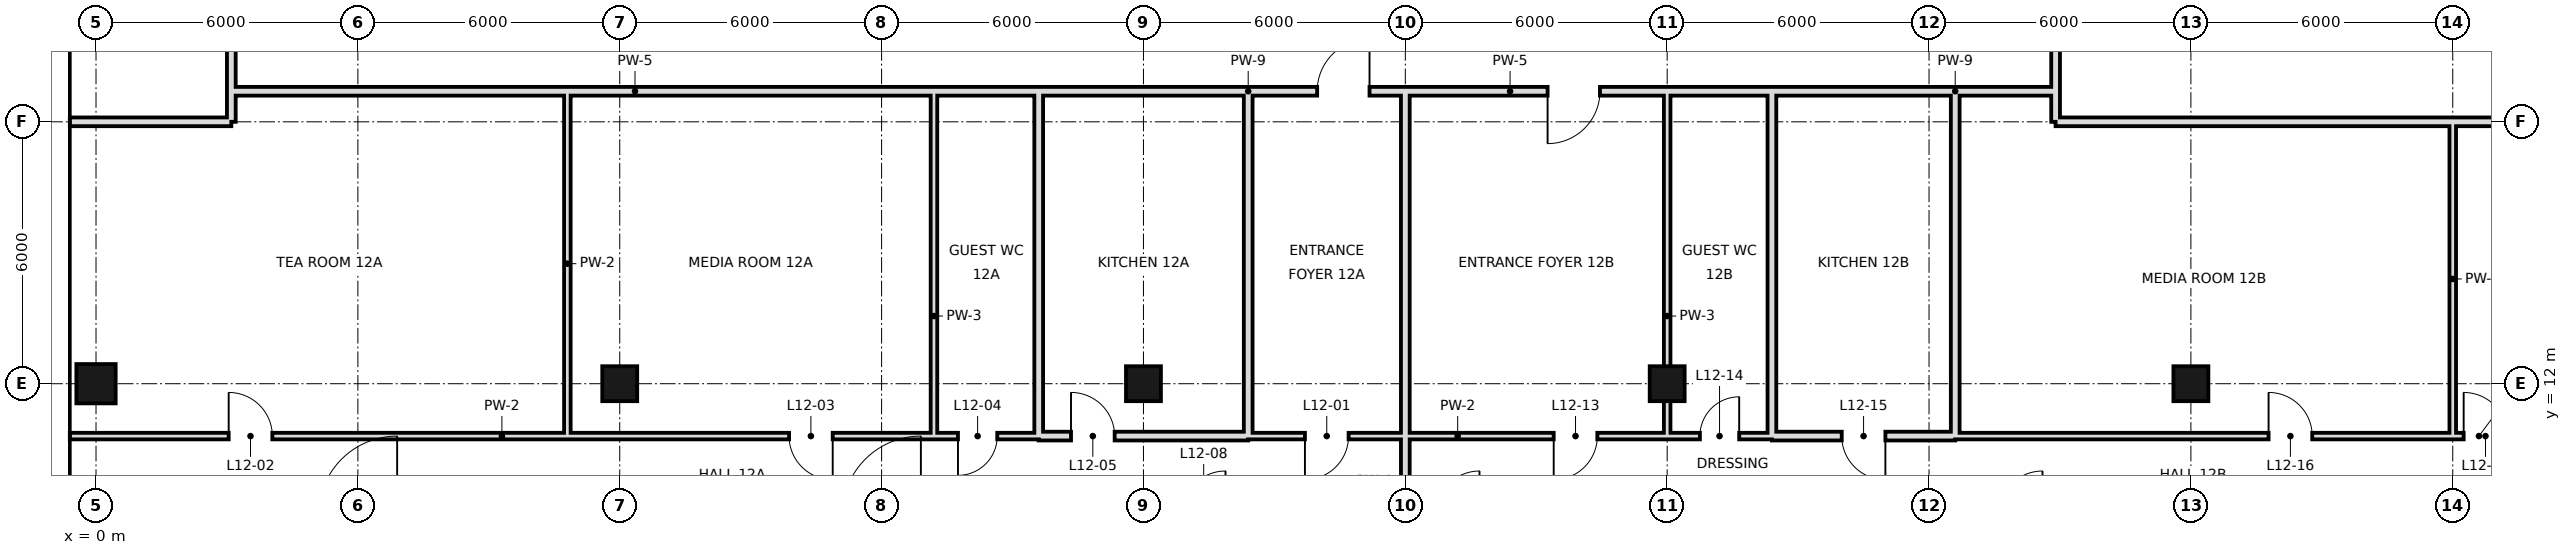
"""IFC4 building model, lengths in metres.
Left out: names, types, materials, properties, quantities, classifications, styles, units other than length and angle.
Written with IfcOpenShell. Run it as: python <this file> out.ifc"""

import sys

from ifc_helpers import new_model, si_unit, direction, frame, frame_2d, origin, origin_2d, place, context, subcontext, project, spatial, rectangle, hollow_rectangle, extrude, element, fill, save


model = new_model("IFC4")
c1 = context("Model", 3, precision=1e-05, world=origin(), true_north=direction((0.0, 1.0)))
c2 = subcontext(c1, "Body", "Model", "MODEL_VIEW")
j1 = project(units=[si_unit("LENGTHUNIT", "METRE"), si_unit("PLANEANGLEUNIT", "RADIAN")], contexts=[c1])
p1 = place(None, origin())
s1 = spatial("IfcSite", under=j1, at=p1, CompositionType="ELEMENT")
p2 = place(p1, origin())
s2 = spatial("IfcBuilding", under=s1, at=p2, CompositionType="ELEMENT")
p3 = place(p2, frame((0.0, 0.0, 64.2)))
s3 = spatial("IfcBuildingStorey", under=s2, at=p3, CompositionType="ELEMENT", Elevation=64.2)
p4 = place(p3, frame((0.0, 12.0, 0.0), z_axis=(0.0, 0.0, 1.0), x_axis=(1.0, 0.0, 0.0)))
e1 = element("IfcColumn", 1, at=p4, inside=s3, PredefinedType="COLUMN", context=c2, shape_type="SweptSolid", body=[
    extrude(hollow_rectangle(XDim=0.9, YDim=0.9, WallThickness=0.045, at=origin_2d()), origin(), (0.0, 0.0, 1.0), 3.6),
])
for number, where, z_axis, x_axis in (
    (2, (12.0, 12.0, 0.0), (0.0, 0.0, 1.0), (1.0, 0.0, 0.0)),
    (3, (24.0, 12.0, 0.0), (0.0, 0.0, 1.0), (1.0, 0.0, 0.0)),
    (4, (36.0, 12.0, 0.0), (0.0, 0.0, 1.0), (1.0, 0.0, 0.0)),
    (5, (48.0, 12.0, 0.0), (0.0, 0.0, 1.0), (1.0, 0.0, 0.0)),
):
    element("IfcColumn", number, at=place(p3, frame(where, z_axis=z_axis, x_axis=x_axis)), inside=s3, PredefinedType="COLUMN", context=c2, shape_type="SweptSolid", body=[
        extrude(hollow_rectangle(XDim=0.8, YDim=0.8, WallThickness=0.04, at=origin_2d()), origin(), (0.0, 0.0, 1.0), 3.6),
    ])
for number, where, z_axis, x_axis in (
    (6, (10.8, 10.8, 0.0), (0.0, 0.0, 1.0), (0.0, 1.0, 0.0)),
    (7, (19.2, 10.8, 0.0), (0.0, 0.0, 1.0), (0.0, 1.0, 0.0)),
):
    element("IfcWall", number, at=place(p3, frame(where, z_axis=z_axis, x_axis=x_axis)), inside=s3, PredefinedType="PARTITIONING", context=c2, shape_type="SweptSolid", body=[
        extrude(rectangle(XDim=7.9, YDim=0.15, at=frame_2d((3.95, 0.0))), origin(), (0.0, 0.0, 1.0), 3.42),
    ])
for number, where, z_axis, x_axis in (
    (8, (21.6, 10.8, 0.0), (0.0, 0.0, 1.0), (0.0, 1.0, 0.0)),
    (9, (26.4, 10.8, 0.0), (0.0, 0.0, 1.0), (0.0, 1.0, 0.0)),
):
    element("IfcWall", number, at=place(p3, frame(where, z_axis=z_axis, x_axis=x_axis)), inside=s3, PredefinedType="SOLIDWALL", context=c2, shape_type="SweptSolid", body=[
        extrude(rectangle(XDim=7.9, YDim=0.2, at=frame_2d((3.95, 0.0))), origin(), (0.0, 0.0, 1.0), 2.72),
    ])
p5 = place(p3, frame((3.1, 18.0, 0.0), z_axis=(0.0, 0.0, 1.0), x_axis=(0.0, 1.0, 0.0)))
e10 = element("IfcWall", 10, at=p5, inside=s3, PredefinedType="SOLIDWALL", context=c2, shape_type="SweptSolid", body=[
    extrude(rectangle(XDim=27.949, YDim=0.2, at=frame_2d((13.975, 0.0))), origin(), (0.0, 0.0, 1.0), 2.97),
])
p6 = place(p5, frame((8.36, 0.0, 0.0)))
e11 = element("IfcOpeningElement", 11, at=p6, cuts=e10, PredefinedType="OPENING", context=c2, shape_type="SweptSolid", body=[
    extrude(rectangle(XDim=1.2, YDim=2.4, at=frame_2d((0.6, 1.2))), frame((0.0, 0.11, 0.0), z_axis=(0.0, -1.0, 0.0), x_axis=(1.0, 0.0, 0.0)), (0.0, 0.0, 1.0), 0.22),
])
p7 = place(p3, frame((30.0, -0.6, 0.0), z_axis=(0.0, 0.0, 1.0), x_axis=(0.0, 1.0, 0.0)))
e12 = element("IfcWall", 12, at=p7, inside=s3, PredefinedType="SOLIDWALL", context=c2, shape_type="SweptSolid", body=[
    extrude(rectangle(XDim=19.3, YDim=0.2, at=frame_2d((9.65, 0.0))), origin(), (0.0, 0.0, 1.0), 2.72),
])
p8 = place(p3, frame((36.0, 10.8, 0.0), z_axis=(0.0, 0.0, 1.0), x_axis=(0.0, 1.0, 0.0)))
e13 = element("IfcWall", 13, at=p8, inside=s3, PredefinedType="PARTITIONING", context=c2, shape_type="SweptSolid", body=[
    extrude(rectangle(XDim=7.9, YDim=0.15, at=frame_2d((3.95, 0.0))), origin(), (0.0, 0.0, 1.0), 2.72),
])
for number, where, z_axis, x_axis in (
    (14, (38.4, 10.8, 0.0), (0.0, 0.0, 1.0), (0.0, 1.0, 0.0)),
    (15, (42.6, 10.8, 0.0), (0.0, 0.0, 1.0), (0.0, 1.0, 0.0)),
):
    element("IfcWall", number, at=place(p3, frame(where, z_axis=z_axis, x_axis=x_axis)), inside=s3, PredefinedType="SOLIDWALL", context=c2, shape_type="SweptSolid", body=[
        extrude(rectangle(XDim=7.9, YDim=0.2, at=frame_2d((3.95, 0.0))), origin(), (0.0, 0.0, 1.0), 2.72),
    ])
p9 = place(p3, frame((44.9, 18.7, 0.0), z_axis=(0.0, 0.0, 1.0), x_axis=(0.0, 1.0, 0.0)))
e16 = element("IfcWall", 16, at=p9, inside=s3, PredefinedType="SOLIDWALL", context=c2, shape_type="SweptSolid", body=[
    extrude(rectangle(XDim=7.1, YDim=0.2, at=frame_2d((3.55, 0.0))), origin(), (0.0, 0.0, 1.0), 3.42),
])
p10 = place(p3, frame((44.9, 18.0, 0.0), z_axis=(0.0, 0.0, 1.0), x_axis=(0.0, 1.0, 0.0)))
e17 = element("IfcWall", 17, at=p10, inside=s3, PredefinedType="SOLIDWALL", context=c2, shape_type="SweptSolid", body=[
    extrude(rectangle(XDim=0.7, YDim=0.2, at=frame_2d((0.35, 0.0))), origin(), (0.0, 0.0, 1.0), 2.97),
])
p11 = place(p3, frame((54.0, 10.8, 0.0), z_axis=(0.0, 0.0, 1.0), x_axis=(0.0, 1.0, 0.0)))
e18 = element("IfcWall", 18, at=p11, inside=s3, PredefinedType="PARTITIONING", context=c2, shape_type="SweptSolid", body=[
    extrude(rectangle(XDim=7.2, YDim=0.15, at=frame_2d((3.6, 0.0))), origin(), (0.0, 0.0, 1.0), 3.42),
])
p12 = place(p3, frame((21.6, 10.8, 0.0), z_axis=(0.0, 0.0, 1.0), x_axis=(1.0, 0.0, 0.0)))
e19 = element("IfcWall", 19, at=p12, inside=s3, PredefinedType="SOLIDWALL", context=c2, shape_type="SweptSolid", body=[
    extrude(rectangle(XDim=4.8, YDim=0.2, at=frame_2d((2.4, 0.0))), origin(), (0.0, 0.0, 1.0), 2.72),
])
p13 = place(p12, frame((0.74, 0.0, 0.0)))
e20 = element("IfcOpeningElement", 20, at=p13, cuts=e19, PredefinedType="OPENING", context=c2, shape_type="SweptSolid", body=[
    extrude(rectangle(XDim=1.0, YDim=2.4, at=frame_2d((0.5, 1.2))), frame((0.0, 0.11, 0.0), z_axis=(0.0, -1.0, 0.0), x_axis=(1.0, 0.0, 0.0)), (0.0, 0.0, 1.0), 0.22),
])
p14 = place(p3, frame((38.4, 10.8, 0.0), z_axis=(0.0, 0.0, 1.0), x_axis=(1.0, 0.0, 0.0)))
e21 = element("IfcWall", 21, at=p14, inside=s3, PredefinedType="SOLIDWALL", context=c2, shape_type="SweptSolid", body=[
    extrude(rectangle(XDim=4.2, YDim=0.2, at=frame_2d((2.1, 0.0))), origin(), (0.0, 0.0, 1.0), 2.72),
])
p15 = place(p14, frame((1.6, 0.0, 0.0)))
e22 = element("IfcOpeningElement", 22, at=p15, cuts=e21, PredefinedType="OPENING", context=c2, shape_type="SweptSolid", body=[
    extrude(rectangle(XDim=1.0, YDim=2.4, at=frame_2d((0.5, 1.2))), frame((0.0, 0.11, 0.0), z_axis=(0.0, -1.0, 0.0), x_axis=(1.0, 0.0, 0.0)), (0.0, 0.0, 1.0), 0.22),
])
p16 = place(p3, frame((-0.6, 10.8, 0.0), z_axis=(0.0, 0.0, 1.0), x_axis=(1.0, 0.0, 0.0)))
e23 = element("IfcWall", 23, at=p16, inside=s3, PredefinedType="PARTITIONING", context=c2, shape_type="SweptSolid", body=[
    extrude(rectangle(XDim=19.8, YDim=0.15, at=frame_2d((9.9, 0.0))), origin(), (0.0, 0.0, 1.0), 3.42),
])
p17 = place(p16, frame((3.64, 0.0, 0.0)))
e24 = element("IfcOpeningElement", 24, at=p17, cuts=e23, PredefinedType="OPENING", context=c2, shape_type="SweptSolid", body=[
    extrude(rectangle(XDim=1.0, YDim=2.4, at=frame_2d((0.5, 1.2))), frame((0.0, 0.085, 0.0), z_axis=(0.0, -1.0, 0.0), x_axis=(1.0, 0.0, 0.0)), (0.0, 0.0, 1.0), 0.17),
])
p18 = place(p16, frame((16.48, 0.0, 0.0)))
e25 = element("IfcOpeningElement", 25, at=p18, cuts=e23, PredefinedType="OPENING", context=c2, shape_type="SweptSolid", body=[
    extrude(rectangle(XDim=1.0, YDim=2.4, at=frame_2d((0.5, 1.2))), frame((0.0, 0.085, 0.0), z_axis=(0.0, -1.0, 0.0), x_axis=(1.0, 0.0, 0.0)), (0.0, 0.0, 1.0), 0.17),
])
p19 = place(p3, frame((26.4, 10.8, 0.0), z_axis=(0.0, 0.0, 1.0), x_axis=(1.0, 0.0, 0.0)))
e26 = element("IfcWall", 26, at=p19, inside=s3, PredefinedType="PARTITIONING", context=c2, shape_type="SweptSolid", body=[
    extrude(rectangle(XDim=9.6, YDim=0.15, at=frame_2d((4.8, 0.0))), origin(), (0.0, 0.0, 1.0), 3.42),
])
p20 = place(p19, frame((1.3, 0.0, 0.0)))
e27 = element("IfcOpeningElement", 27, at=p20, cuts=e26, PredefinedType="OPENING", context=c2, shape_type="SweptSolid", body=[
    extrude(rectangle(XDim=1.0, YDim=2.4, at=frame_2d((0.5, 1.2))), frame((0.0, 0.085, 0.0), z_axis=(0.0, -1.0, 0.0), x_axis=(1.0, 0.0, 0.0)), (0.0, 0.0, 1.0), 0.17),
])
p21 = place(p19, frame((7.0, 0.0, 0.0)))
e28 = element("IfcOpeningElement", 28, at=p21, cuts=e26, PredefinedType="OPENING", context=c2, shape_type="SweptSolid", body=[
    extrude(rectangle(XDim=1.0, YDim=2.4, at=frame_2d((0.5, 1.2))), frame((0.0, 0.085, 0.0), z_axis=(0.0, -1.0, 0.0), x_axis=(1.0, 0.0, 0.0)), (0.0, 0.0, 1.0), 0.17),
])
p22 = place(p3, frame((42.6, 10.8, 0.0), z_axis=(0.0, 0.0, 1.0), x_axis=(1.0, 0.0, 0.0)))
e29 = element("IfcWall", 29, at=p22, inside=s3, PredefinedType="PARTITIONING", context=c2, shape_type="SweptSolid", body=[
    extrude(rectangle(XDim=24.0, YDim=0.15, at=frame_2d((12.0, 0.0))), origin(), (0.0, 0.0, 1.0), 3.42),
])
p23 = place(p22, frame((7.18, 0.0, 0.0)))
e30 = element("IfcOpeningElement", 30, at=p23, cuts=e29, PredefinedType="OPENING", context=c2, shape_type="SweptSolid", body=[
    extrude(rectangle(XDim=1.0, YDim=2.4, at=frame_2d((0.5, 1.2))), frame((0.0, 0.085, 0.0), z_axis=(0.0, -1.0, 0.0), x_axis=(1.0, 0.0, 0.0)), (0.0, 0.0, 1.0), 0.17),
])
p24 = place(p22, frame((11.65, 0.0, 0.0)))
e31 = element("IfcOpeningElement", 31, at=p24, cuts=e29, PredefinedType="OPENING", context=c2, shape_type="SweptSolid", body=[
    extrude(rectangle(XDim=1.0, YDim=2.4, at=frame_2d((0.5, 1.2))), frame((0.0, 0.085, 0.0), z_axis=(0.0, -1.0, 0.0), x_axis=(1.0, 0.0, 0.0)), (0.0, 0.0, 1.0), 0.17),
])
p25 = place(p3, frame((19.2, 10.8, 0.0), z_axis=(0.0, 0.0, 1.0), x_axis=(1.0, 0.0, 0.0)))
e32 = element("IfcWall", 32, at=p25, inside=s3, PredefinedType="PARTITIONING", context=c2, shape_type="SweptSolid", body=[
    extrude(rectangle(XDim=2.4, YDim=0.15, at=frame_2d((1.2, 0.0))), origin(), (0.0, 0.0, 1.0), 3.42),
])
p26 = place(p25, frame((0.55, 0.0, 0.0)))
e33 = element("IfcOpeningElement", 33, at=p26, cuts=e32, PredefinedType="OPENING", context=c2, shape_type="SweptSolid", body=[
    extrude(rectangle(XDim=0.9, YDim=2.4, at=frame_2d((0.45, 1.2))), frame((0.0, 0.085, 0.0), z_axis=(0.0, -1.0, 0.0), x_axis=(1.0, 0.0, 0.0)), (0.0, 0.0, 1.0), 0.17),
])
p27 = place(p3, frame((36.0, 10.8, 0.0), z_axis=(0.0, 0.0, 1.0), x_axis=(1.0, 0.0, 0.0)))
e34 = element("IfcWall", 34, at=p27, inside=s3, PredefinedType="PARTITIONING", context=c2, shape_type="SweptSolid", body=[
    extrude(rectangle(XDim=2.4, YDim=0.15, at=frame_2d((1.2, 0.0))), origin(), (0.0, 0.0, 1.0), 3.42),
])
p28 = place(p27, frame((0.75, 0.0, 0.0)))
e35 = element("IfcOpeningElement", 35, at=p28, cuts=e34, PredefinedType="OPENING", context=c2, shape_type="SweptSolid", body=[
    extrude(rectangle(XDim=0.9, YDim=2.4, at=frame_2d((0.45, 1.2))), frame((0.0, 0.085, 0.0), z_axis=(0.0, -1.0, 0.0), x_axis=(1.0, 0.0, 0.0)), (0.0, 0.0, 1.0), 0.17),
])
p29 = place(p3, frame((-0.6, 18.0, 0.0), z_axis=(0.0, 0.0, 1.0), x_axis=(1.0, 0.0, 0.0)))
e36 = element("IfcWall", 36, at=p29, inside=s3, PredefinedType="SOLIDWALL", context=c2, shape_type="SweptSolid", body=[
    extrude(rectangle(XDim=3.7, YDim=0.2, at=frame_2d((1.85, 0.0))), origin(), (0.0, 0.0, 1.0), 2.72),
])
p30 = place(p3, frame((44.9, 18.0, 0.0), z_axis=(0.0, 0.0, 1.0), x_axis=(1.0, 0.0, 0.0)))
e37 = element("IfcWall", 37, at=p30, inside=s3, PredefinedType="SOLIDWALL", context=c2, shape_type="SweptSolid", body=[
    extrude(rectangle(XDim=21.7, YDim=0.2, at=frame_2d((10.85, 0.0))), origin(), (0.0, 0.0, 1.0), 2.52),
])
p31 = place(p3, frame((3.1, 18.7, 0.0), z_axis=(0.0, 0.0, 1.0), x_axis=(1.0, 0.0, 0.0)))
e38 = element("IfcWall", 38, at=p31, inside=s3, PredefinedType="SOLIDWALL", context=c2, shape_type="SweptSolid", body=[
    extrude(rectangle(XDim=18.5, YDim=0.2, at=frame_2d((9.25, 0.0))), origin(), (0.0, 0.0, 1.0), 2.72),
])
p32 = place(p3, frame((26.4, 18.7, 0.0), z_axis=(0.0, 0.0, 1.0), x_axis=(1.0, 0.0, 0.0)))
e39 = element("IfcWall", 39, at=p32, inside=s3, PredefinedType="SOLIDWALL", context=c2, shape_type="SweptSolid", body=[
    extrude(rectangle(XDim=12.0, YDim=0.2, at=frame_2d((6.0, 0.0))), origin(), (0.0, 0.0, 1.0), 2.72),
])
p33 = place(p32, frame((1.58, 0.0, 0.0)))
e40 = element("IfcOpeningElement", 40, at=p33, cuts=e39, PredefinedType="OPENING", context=c2, shape_type="SweptSolid", body=[
    extrude(rectangle(XDim=1.2, YDim=2.4, at=frame_2d((0.6, 1.2))), frame((0.0, 0.11, 0.0), z_axis=(0.0, -1.0, 0.0), x_axis=(1.0, 0.0, 0.0)), (0.0, 0.0, 1.0), 0.22),
])
p34 = place(p32, frame((6.86, 0.0, 0.0)))
e41 = element("IfcOpeningElement", 41, at=p34, cuts=e39, PredefinedType="OPENING", context=c2, shape_type="SweptSolid", body=[
    extrude(rectangle(XDim=1.2, YDim=2.4, at=frame_2d((0.6, 1.2))), frame((0.0, 0.11, 0.0), z_axis=(0.0, -1.0, 0.0), x_axis=(1.0, 0.0, 0.0)), (0.0, 0.0, 1.0), 0.22),
])
p35 = place(p3, frame((42.6, 18.7, 0.0), z_axis=(0.0, 0.0, 1.0), x_axis=(1.0, 0.0, 0.0)))
e42 = element("IfcWall", 42, at=p35, inside=s3, PredefinedType="SOLIDWALL", context=c2, shape_type="SweptSolid", body=[
    extrude(rectangle(XDim=2.3, YDim=0.2, at=frame_2d((1.15, 0.0))), origin(), (0.0, 0.0, 1.0), 3.42),
])
p36 = place(p3, frame((21.6, 18.7, 0.0), z_axis=(0.0, 0.0, 1.0), x_axis=(1.0, 0.0, 0.0)))
e43 = element("IfcWall", 43, at=p36, inside=s3, PredefinedType="SOLIDWALL", context=c2, shape_type="SweptSolid", body=[
    extrude(rectangle(XDim=4.8, YDim=0.2, at=frame_2d((2.4, 0.0))), origin(), (0.0, 0.0, 1.0), 3.42),
])
p37 = place(p3, frame((38.4, 18.7, 0.0), z_axis=(0.0, 0.0, 1.0), x_axis=(1.0, 0.0, 0.0)))
e44 = element("IfcWall", 44, at=p37, inside=s3, PredefinedType="SOLIDWALL", context=c2, shape_type="SweptSolid", body=[
    extrude(rectangle(XDim=4.2, YDim=0.2, at=frame_2d((2.1, 0.0))), origin(), (0.0, 0.0, 1.0), 2.72),
])
p38 = place(p20, frame((1.0, 0.0, 0.0), z_axis=(0.0, 0.0, 1.0), x_axis=(-1.0, 0.0, 0.0)))
e45 = element("IfcDoor", 45, at=p38, inside=s3, OperationType="SINGLE_SWING_RIGHT", PredefinedType="DOOR", context=c2, shape_type="SweptSolid", body=[
    extrude(rectangle(XDim=1.0, YDim=2.4, at=frame_2d((0.5, 1.2))), frame((0.0, 0.025, 0.0), z_axis=(0.0, -1.0, 0.0), x_axis=(1.0, 0.0, 0.0)), (0.0, 0.0, 1.0), 0.05),
])
fill(e27, e45)
p39 = place(p17, origin())
e46 = element("IfcDoor", 46, at=p39, inside=s3, OperationType="SINGLE_SWING_LEFT", PredefinedType="DOOR", context=c2, shape_type="SweptSolid", body=[
    extrude(rectangle(XDim=1.0, YDim=2.4, at=frame_2d((0.5, 1.2))), frame((0.0, 0.025, 0.0), z_axis=(0.0, -1.0, 0.0), x_axis=(1.0, 0.0, 0.0)), (0.0, 0.0, 1.0), 0.05),
])
fill(e24, e46)
p40 = place(p18, origin())
e47 = element("IfcDoor", 47, at=p40, inside=s3, OperationType="SINGLE_SWING_RIGHT", PredefinedType="DOOR", context=c2, shape_type="SweptSolid", body=[
    extrude(rectangle(XDim=1.0, YDim=2.4, at=frame_2d((0.5, 1.2))), frame((0.0, 0.025, 0.0), z_axis=(0.0, -1.0, 0.0), x_axis=(1.0, 0.0, 0.0)), (0.0, 0.0, 1.0), 0.05),
])
fill(e25, e47)
p41 = place(p26, frame((0.9, 0.0, 0.0), z_axis=(0.0, 0.0, 1.0), x_axis=(-1.0, 0.0, 0.0)))
e48 = element("IfcDoor", 48, at=p41, inside=s3, OperationType="SINGLE_SWING_RIGHT", PredefinedType="DOOR", context=c2, shape_type="SweptSolid", body=[
    extrude(rectangle(XDim=0.9, YDim=2.4, at=frame_2d((0.45, 1.2))), frame((0.0, 0.025, 0.0), z_axis=(0.0, -1.0, 0.0), x_axis=(1.0, 0.0, 0.0)), (0.0, 0.0, 1.0), 0.05),
])
fill(e33, e48)
p42 = place(p13, origin())
e49 = element("IfcDoor", 49, at=p42, inside=s3, OperationType="SINGLE_SWING_LEFT", PredefinedType="DOOR", context=c2, shape_type="SweptSolid", body=[
    extrude(rectangle(XDim=1.0, YDim=2.4, at=frame_2d((0.5, 1.2))), frame((0.0, 0.025, 0.0), z_axis=(0.0, -1.0, 0.0), x_axis=(1.0, 0.0, 0.0)), (0.0, 0.0, 1.0), 0.05),
])
fill(e20, e49)
p43 = place(p21, frame((1.0, 0.0, 0.0), z_axis=(0.0, 0.0, 1.0), x_axis=(-1.0, 0.0, 0.0)))
e50 = element("IfcDoor", 50, at=p43, inside=s3, OperationType="SINGLE_SWING_RIGHT", PredefinedType="DOOR", context=c2, shape_type="SweptSolid", body=[
    extrude(rectangle(XDim=1.0, YDim=2.4, at=frame_2d((0.5, 1.2))), frame((0.0, 0.025, 0.0), z_axis=(0.0, -1.0, 0.0), x_axis=(1.0, 0.0, 0.0)), (0.0, 0.0, 1.0), 0.05),
])
fill(e28, e50)
p44 = place(p28, frame((0.9, 0.0, 0.0), z_axis=(0.0, 0.0, 1.0), x_axis=(-1.0, 0.0, 0.0)))
e51 = element("IfcDoor", 51, at=p44, inside=s3, OperationType="SINGLE_SWING_LEFT", PredefinedType="DOOR", context=c2, shape_type="SweptSolid", body=[
    extrude(rectangle(XDim=0.9, YDim=2.4, at=frame_2d((0.45, 1.2))), frame((0.0, 0.025, 0.0), z_axis=(0.0, -1.0, 0.0), x_axis=(1.0, 0.0, 0.0)), (0.0, 0.0, 1.0), 0.05),
])
fill(e35, e51)
p45 = place(p15, origin())
e52 = element("IfcDoor", 52, at=p45, inside=s3, OperationType="SINGLE_SWING_RIGHT", PredefinedType="DOOR", context=c2, shape_type="SweptSolid", body=[
    extrude(rectangle(XDim=1.0, YDim=2.4, at=frame_2d((0.5, 1.2))), frame((0.0, 0.025, 0.0), z_axis=(0.0, -1.0, 0.0), x_axis=(1.0, 0.0, 0.0)), (0.0, 0.0, 1.0), 0.05),
])
fill(e22, e52)
p46 = place(p23, origin())
e53 = element("IfcDoor", 53, at=p46, inside=s3, OperationType="SINGLE_SWING_LEFT", PredefinedType="DOOR", context=c2, shape_type="SweptSolid", body=[
    extrude(rectangle(XDim=1.0, YDim=2.4, at=frame_2d((0.5, 1.2))), frame((0.0, 0.025, 0.0), z_axis=(0.0, -1.0, 0.0), x_axis=(1.0, 0.0, 0.0)), (0.0, 0.0, 1.0), 0.05),
])
fill(e30, e53)
p47 = place(p24, origin())
e54 = element("IfcDoor", 54, at=p47, inside=s3, OperationType="SINGLE_SWING_LEFT", PredefinedType="DOOR", context=c2, shape_type="SweptSolid", body=[
    extrude(rectangle(XDim=1.0, YDim=2.4, at=frame_2d((0.5, 1.2))), frame((0.0, 0.025, 0.0), z_axis=(0.0, -1.0, 0.0), x_axis=(1.0, 0.0, 0.0)), (0.0, 0.0, 1.0), 0.05),
])
fill(e31, e54)
p48 = place(p33, frame((1.2, 0.0, 0.0), z_axis=(0.0, 0.0, 1.0), x_axis=(-1.0, 0.0, 0.0)))
e55 = element("IfcDoor", 55, at=p48, inside=s3, OperationType="SINGLE_SWING_LEFT", PredefinedType="DOOR", context=c2, shape_type="SweptSolid", body=[
    extrude(rectangle(XDim=1.2, YDim=2.4, at=frame_2d((0.6, 1.2))), frame((0.0, 0.025, 0.0), z_axis=(0.0, -1.0, 0.0), x_axis=(1.0, 0.0, 0.0)), (0.0, 0.0, 1.0), 0.05),
])
fill(e40, e55)
p49 = place(p34, frame((1.2, 0.0, 0.0), z_axis=(0.0, 0.0, 1.0), x_axis=(-1.0, 0.0, 0.0)))
e56 = element("IfcDoor", 56, at=p49, inside=s3, OperationType="SINGLE_SWING_RIGHT", PredefinedType="DOOR", context=c2, shape_type="SweptSolid", body=[
    extrude(rectangle(XDim=1.2, YDim=2.4, at=frame_2d((0.6, 1.2))), frame((0.0, 0.025, 0.0), z_axis=(0.0, -1.0, 0.0), x_axis=(1.0, 0.0, 0.0)), (0.0, 0.0, 1.0), 0.05),
])
fill(e41, e56)
save(model, sys.argv[1])
